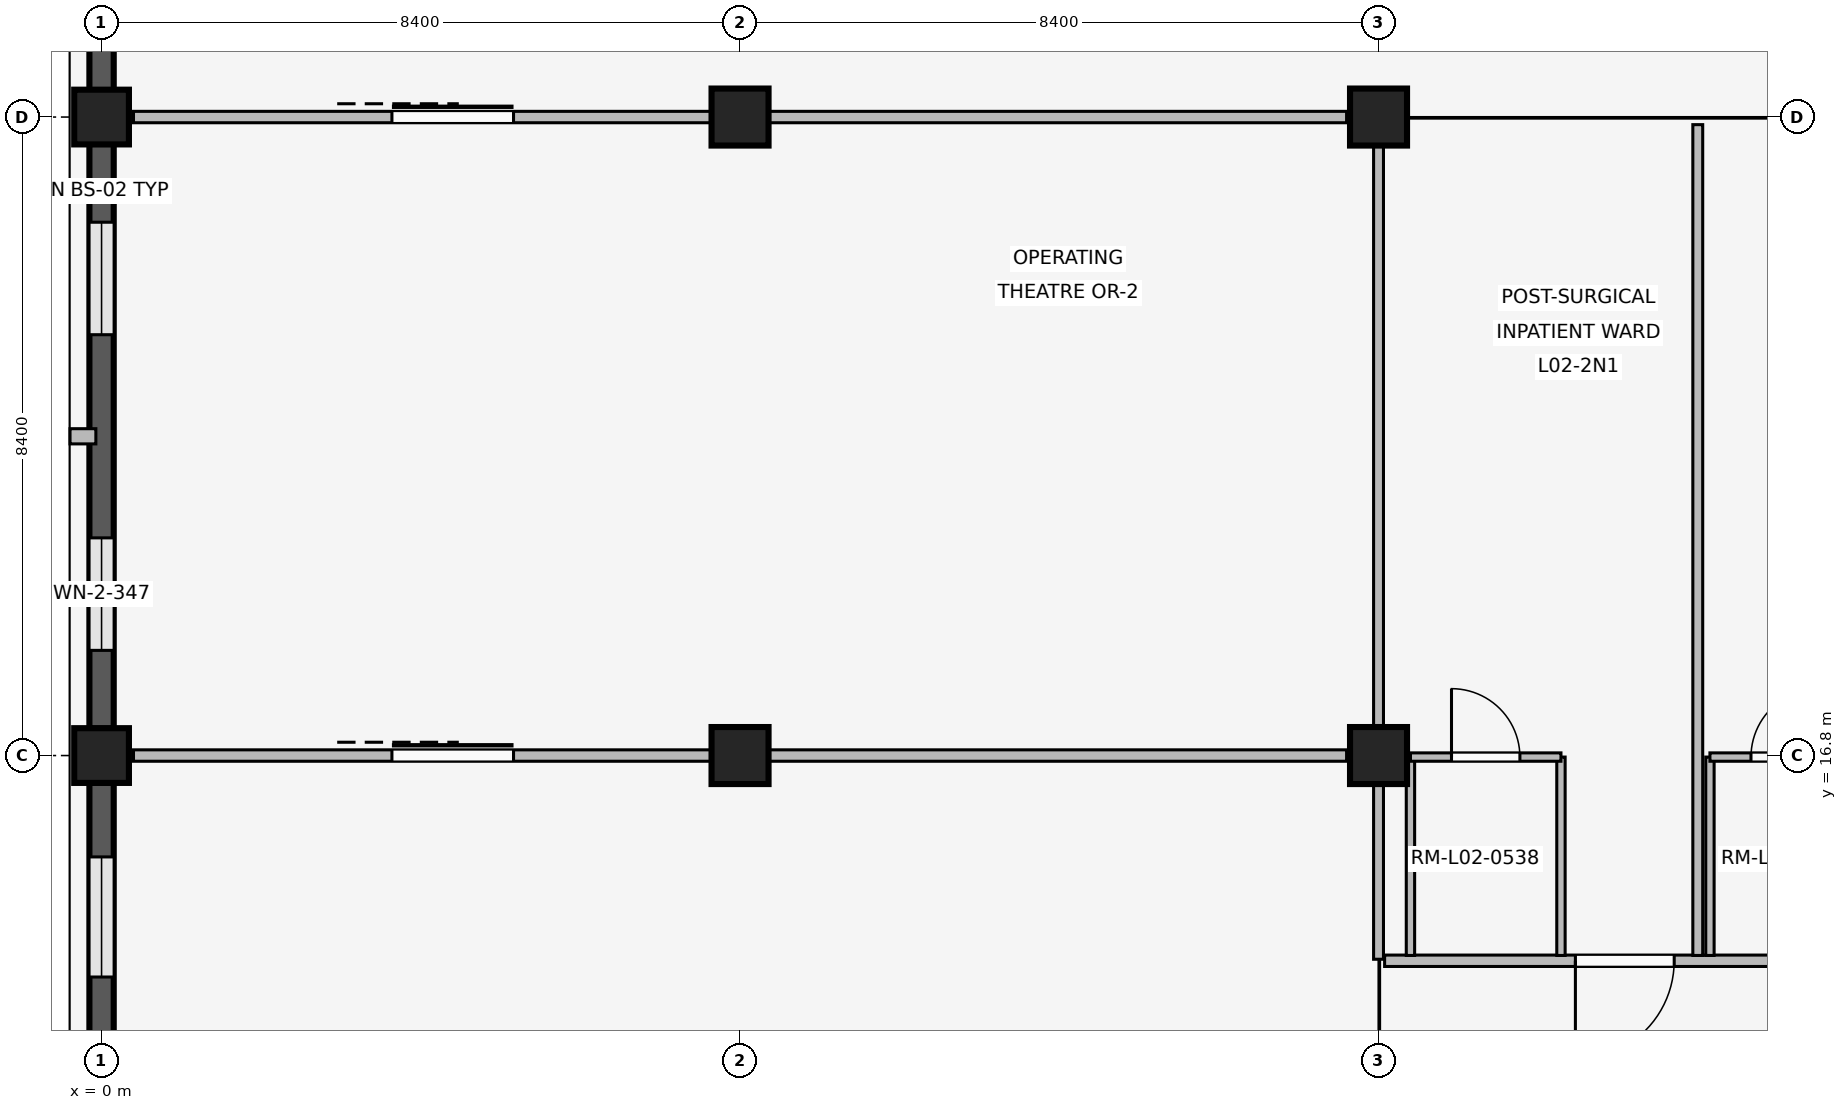
"""IFC4 building model, lengths in metres.
Left out: names, types, materials, properties, quantities, classifications, styles, units other than length and angle.
Written with IfcOpenShell. Run it as: python <this file> out.ifc"""

import sys

from ifc_helpers import new_model, si_unit, direction, frame, frame_2d, origin, origin_2d, place, context, subcontext, project, spatial, rectangle, extrude, element, fill, save


model = new_model("IFC4")
c1 = context("Model", 3, precision=1e-05, world=origin(), true_north=direction((0.0, 1.0)))
c2 = subcontext(c1, "Body", "Model", "MODEL_VIEW")
j1 = project(units=[si_unit("LENGTHUNIT", "METRE"), si_unit("PLANEANGLEUNIT", "RADIAN")], contexts=[c1])
p1 = place(None, origin())
s1 = spatial("IfcSite", under=j1, at=p1, CompositionType="ELEMENT")
p2 = place(p1, origin())
s2 = spatial("IfcBuilding", under=s1, at=p2, CompositionType="ELEMENT")
p3 = place(p2, frame((0.0, 0.0, 8.1)))
s3 = spatial("IfcBuildingStorey", under=s2, at=p3, CompositionType="ELEMENT", Elevation=8.1)
for number, where, z_axis, x_axis in (
    (1, (0.0, 16.8, 0.0), (0.0, 0.0, 1.0), (1.0, 0.0, 0.0)),
    (2, (0.0, 25.2, 0.0), (0.0, 0.0, 1.0), (1.0, 0.0, 0.0)),
):
    element("IfcColumn", number, at=place(p3, frame(where, z_axis=z_axis, x_axis=x_axis)), inside=s3, PredefinedType="COLUMN", context=c2, shape_type="SweptSolid", body=[
        extrude(rectangle(XDim=0.72, YDim=0.72, at=origin_2d()), origin(), (0.0, 0.0, 1.0), 4.8),
    ])
for number, where, z_axis, x_axis in (
    (3, (8.4, 16.8, 0.0), (0.0, 0.0, 1.0), (1.0, 0.0, 0.0)),
    (4, (8.4, 25.2, 0.0), (0.0, 0.0, 1.0), (1.0, 0.0, 0.0)),
    (5, (16.8, 16.8, 0.0), (0.0, 0.0, 1.0), (1.0, 0.0, 0.0)),
    (6, (16.8, 25.2, 0.0), (0.0, 0.0, 1.0), (1.0, 0.0, 0.0)),
):
    element("IfcColumn", number, at=place(p3, frame(where, z_axis=z_axis, x_axis=x_axis)), inside=s3, PredefinedType="COLUMN", context=c2, shape_type="SweptSolid", body=[
        extrude(rectangle(XDim=0.75, YDim=0.75, at=origin_2d()), origin(), (0.0, 0.0, 1.0), 4.8),
    ])
p4 = place(p3, frame((0.0, 8.755, 0.0), z_axis=(0.0, 0.0, 1.0), x_axis=(0.0, 1.0, 0.0)))
e7 = element("IfcWall", 7, at=p4, inside=s3, PredefinedType="SOLIDWALL", context=c2, shape_type="SweptSolid", body=[
    extrude(rectangle(XDim=7.69, YDim=0.32, at=frame_2d((3.845, 0.0))), origin(), (0.0, 0.0, 1.0), 3.86),
])
p5 = place(p4, frame((0.979, 0.0, 0.85)))
e8 = element("IfcOpeningElement", 8, at=p5, cuts=e7, PredefinedType="OPENING", context=c2, shape_type="SweptSolid", body=[
    extrude(rectangle(XDim=1.58, YDim=1.7, at=frame_2d((0.79, 0.85))), frame((0.0, 0.17, 0.0), z_axis=(0.0, -1.0, 0.0), x_axis=(1.0, 0.0, 0.0)), (0.0, 0.0, 1.0), 0.34),
])
p6 = place(p4, frame((5.131, 0.0, 0.85)))
e9 = element("IfcOpeningElement", 9, at=p6, cuts=e7, PredefinedType="OPENING", context=c2, shape_type="SweptSolid", body=[
    extrude(rectangle(XDim=1.58, YDim=1.7, at=frame_2d((0.79, 0.85))), frame((0.0, 0.17, 0.0), z_axis=(0.0, -1.0, 0.0), x_axis=(1.0, 0.0, 0.0)), (0.0, 0.0, 1.0), 0.34),
])
p7 = place(p3, frame((0.0, 17.155, 0.0), z_axis=(0.0, 0.0, 1.0), x_axis=(0.0, 1.0, 0.0)))
e10 = element("IfcWall", 10, at=p7, inside=s3, PredefinedType="SOLIDWALL", context=c2, shape_type="SweptSolid", body=[
    extrude(rectangle(XDim=7.69, YDim=0.32, at=frame_2d((3.845, 0.0))), origin(), (0.0, 0.0, 1.0), 3.86),
])
p8 = place(p7, frame((1.029, 0.0, 0.85)))
e11 = element("IfcOpeningElement", 11, at=p8, cuts=e10, PredefinedType="OPENING", context=c2, shape_type="SweptSolid", body=[
    extrude(rectangle(XDim=1.48, YDim=1.6, at=frame_2d((0.74, 0.8))), frame((0.0, 0.17, 0.0), z_axis=(0.0, -1.0, 0.0), x_axis=(1.0, 0.0, 0.0)), (0.0, 0.0, 1.0), 0.34),
])
p9 = place(p7, frame((5.181, 0.0, 0.85)))
e12 = element("IfcOpeningElement", 12, at=p9, cuts=e10, PredefinedType="OPENING", context=c2, shape_type="SweptSolid", body=[
    extrude(rectangle(XDim=1.48, YDim=1.6, at=frame_2d((0.74, 0.8))), frame((0.0, 0.17, 0.0), z_axis=(0.0, -1.0, 0.0), x_axis=(1.0, 0.0, 0.0)), (0.0, 0.0, 1.0), 0.34),
])
p10 = place(p3, frame((-0.075, 21.0, 0.0), z_axis=(0.0, 0.0, 1.0), x_axis=(-1.0, 0.0, 0.0)))
e13 = element("IfcWall", 13, at=p10, inside=s3, PredefinedType="ELEMENTEDWALL", context=c2, shape_type="SweptSolid", body=[
    extrude(rectangle(XDim=0.34, YDim=0.2, at=frame_2d((0.17, 0.0))), origin(), (0.0, 0.0, 1.0), 3.84),
])
p11 = place(p3, frame((0.0, 25.555, 0.0), z_axis=(0.0, 0.0, 1.0), x_axis=(0.0, 1.0, 0.0)))
e14 = element("IfcWall", 14, at=p11, inside=s3, PredefinedType="SOLIDWALL", context=c2, shape_type="SweptSolid", body=[
    extrude(rectangle(XDim=7.69, YDim=0.32, at=frame_2d((3.845, 0.0))), origin(), (0.0, 0.0, 1.0), 3.86),
])
p12 = place(p11, frame((1.059, 0.0, 0.85)))
e15 = element("IfcOpeningElement", 15, at=p12, cuts=e14, PredefinedType="OPENING", context=c2, shape_type="SweptSolid", body=[
    extrude(rectangle(XDim=1.42, YDim=1.45, at=frame_2d((0.71, 0.725))), frame((0.0, 0.17, 0.0), z_axis=(0.0, -1.0, 0.0), x_axis=(1.0, 0.0, 0.0)), (0.0, 0.0, 1.0), 0.34),
])
p13 = place(p11, frame((5.211, 0.0, 0.85)))
e16 = element("IfcOpeningElement", 16, at=p13, cuts=e14, PredefinedType="OPENING", context=c2, shape_type="SweptSolid", body=[
    extrude(rectangle(XDim=1.42, YDim=1.45, at=frame_2d((0.71, 0.725))), frame((0.0, 0.17, 0.0), z_axis=(0.0, -1.0, 0.0), x_axis=(1.0, 0.0, 0.0)), (0.0, 0.0, 1.0), 0.34),
])
p14 = place(p3, frame((16.8, 14.12, 0.0), z_axis=(0.0, 0.0, 1.0), x_axis=(0.0, 1.0, 0.0)))
e17 = element("IfcWall", 17, at=p14, inside=s3, PredefinedType="PARTITIONING", context=c2, shape_type="SweptSolid", body=[
    extrude(rectangle(XDim=10.94, YDim=0.13, at=frame_2d((5.47, 0.0))), origin(), (0.0, 0.0, 1.0), 3.84),
])
p15 = place(p3, frame((25.12, 14.1, 0.0), z_axis=(0.0, 0.0, 1.0), x_axis=(-1.0, 0.0, 0.0)))
e18 = element("IfcWall", 18, at=p15, inside=s3, PredefinedType="PARTITIONING", context=c2, shape_type="SweptSolid", body=[
    extrude(rectangle(XDim=8.24, YDim=0.15, at=frame_2d((4.12, 0.0))), origin(), (0.0, 0.0, 1.0), 3.84),
])
p16 = place(p15, frame((0.73, 0.0, 0.0)))
e19 = element("IfcOpeningElement", 19, at=p16, cuts=e18, PredefinedType="OPENING", context=c2, shape_type="SweptSolid", body=[
    extrude(rectangle(XDim=1.3, YDim=2.25, at=frame_2d((0.65, 1.125))), frame((0.0, 0.085, 0.0), z_axis=(0.0, -1.0, 0.0), x_axis=(1.0, 0.0, 0.0)), (0.0, 0.0, 1.0), 0.17),
])
p17 = place(p15, frame((4.43, 0.0, 0.0)))
e20 = element("IfcOpeningElement", 20, at=p17, cuts=e18, PredefinedType="OPENING", context=c2, shape_type="SweptSolid", body=[
    extrude(rectangle(XDim=1.3, YDim=2.25, at=frame_2d((0.65, 1.125))), frame((0.0, 0.085, 0.0), z_axis=(0.0, -1.0, 0.0), x_axis=(1.0, 0.0, 0.0)), (0.0, 0.0, 1.0), 0.17),
])
p18 = place(p3, frame((21.0, 14.17, 0.0), z_axis=(0.0, 0.0, 1.0), x_axis=(0.0, 1.0, 0.0)))
e21 = element("IfcWall", 21, at=p18, inside=s3, PredefinedType="PARTITIONING", context=c2, shape_type="SweptSolid", body=[
    extrude(rectangle(XDim=10.93, YDim=0.13, at=frame_2d((5.465, 0.0))), origin(), (0.0, 0.0, 1.0), 3.84),
])
for number, where, z_axis, x_axis in (
    (22, (17.22, 14.17, 0.0), (0.0, 0.0, 1.0), (0.0, 1.0, 0.0)),
    (23, (19.2, 14.17, 0.0), (0.0, 0.0, 1.0), (0.0, 1.0, 0.0)),
):
    element("IfcWall", number, at=place(p3, frame(where, z_axis=z_axis, x_axis=x_axis)), inside=s3, PredefinedType="PARTITIONING", context=c2, shape_type="SweptSolid", body=[
        extrude(rectangle(XDim=2.61, YDim=0.11, at=frame_2d((1.305, 0.0))), origin(), (0.0, 0.0, 1.0), 3.84),
    ])
p19 = place(p3, frame((17.22, 16.78, 0.0), z_axis=(0.0, 0.0, 1.0), x_axis=(1.0, 0.0, 0.0)))
e24 = element("IfcWall", 24, at=p19, inside=s3, PredefinedType="PARTITIONING", context=c2, shape_type="SweptSolid", body=[
    extrude(rectangle(XDim=1.98, YDim=0.11, at=frame_2d((0.99, 0.0))), origin(), (0.0, 0.0, 1.0), 3.84),
])
p20 = place(p19, frame((0.54, 0.0, 0.0)))
e25 = element("IfcOpeningElement", 25, at=p20, cuts=e24, PredefinedType="OPENING", context=c2, shape_type="SweptSolid", body=[
    extrude(rectangle(XDim=0.9, YDim=2.1, at=frame_2d((0.45, 1.05))), frame((0.0, 0.065, 0.0), z_axis=(0.0, -1.0, 0.0), x_axis=(1.0, 0.0, 0.0)), (0.0, 0.0, 1.0), 0.13),
])
p21 = place(p3, frame((21.16, 14.17, 0.0), z_axis=(0.0, 0.0, 1.0), x_axis=(0.0, 1.0, 0.0)))
e26 = element("IfcWall", 26, at=p21, inside=s3, PredefinedType="PARTITIONING", context=c2, shape_type="SweptSolid", body=[
    extrude(rectangle(XDim=2.61, YDim=0.11, at=frame_2d((1.305, 0.0))), origin(), (0.0, 0.0, 1.0), 3.84),
])
p22 = place(p3, frame((21.16, 16.78, 0.0), z_axis=(0.0, 0.0, 1.0), x_axis=(1.0, 0.0, 0.0)))
e27 = element("IfcWall", 27, at=p22, inside=s3, PredefinedType="PARTITIONING", context=c2, shape_type="SweptSolid", body=[
    extrude(rectangle(XDim=1.98, YDim=0.11, at=frame_2d((0.99, 0.0))), origin(), (0.0, 0.0, 1.0), 3.84),
])
p23 = place(p22, frame((0.54, 0.0, 0.0)))
e28 = element("IfcOpeningElement", 28, at=p23, cuts=e27, PredefinedType="OPENING", context=c2, shape_type="SweptSolid", body=[
    extrude(rectangle(XDim=0.9, YDim=2.1, at=frame_2d((0.45, 1.05))), frame((0.0, 0.065, 0.0), z_axis=(0.0, -1.0, 0.0), x_axis=(1.0, 0.0, 0.0)), (0.0, 0.0, 1.0), 0.13),
])
p24 = place(p3, frame((0.42, 16.8, 0.0), z_axis=(0.0, 0.0, 1.0), x_axis=(1.0, 0.0, 0.0)))
e29 = element("IfcWall", 29, at=p24, inside=s3, PredefinedType="PARTITIONING", context=c2, shape_type="SweptSolid", body=[
    extrude(rectangle(XDim=15.96, YDim=0.15, at=frame_2d((7.98, 0.0))), origin(), (0.0, 0.0, 1.0), 3.84),
])
p25 = place(p24, frame((3.4, 0.0, 0.0)))
e30 = element("IfcOpeningElement", 30, at=p25, cuts=e29, PredefinedType="OPENING", context=c2, shape_type="SweptSolid", body=[
    extrude(rectangle(XDim=1.6, YDim=2.35, at=frame_2d((0.8, 1.175))), frame((0.0, 0.085, 0.0), z_axis=(0.0, -1.0, 0.0), x_axis=(1.0, 0.0, 0.0)), (0.0, 0.0, 1.0), 0.17),
])
p26 = place(p3, frame((0.42, 25.2, 0.0), z_axis=(0.0, 0.0, 1.0), x_axis=(1.0, 0.0, 0.0)))
e31 = element("IfcWall", 31, at=p26, inside=s3, PredefinedType="PARTITIONING", context=c2, shape_type="SweptSolid", body=[
    extrude(rectangle(XDim=15.96, YDim=0.15, at=frame_2d((7.98, 0.0))), origin(), (0.0, 0.0, 1.0), 3.84),
])
p27 = place(p26, frame((3.4, 0.0, 0.0)))
e32 = element("IfcOpeningElement", 32, at=p27, cuts=e31, PredefinedType="OPENING", context=c2, shape_type="SweptSolid", body=[
    extrude(rectangle(XDim=1.6, YDim=2.35, at=frame_2d((0.8, 1.175))), frame((0.0, 0.085, 0.0), z_axis=(0.0, -1.0, 0.0), x_axis=(1.0, 0.0, 0.0)), (0.0, 0.0, 1.0), 0.17),
])
p28 = place(p6, origin())
e33 = element("IfcWindow", 33, at=p28, inside=s3, PartitioningType="SINGLE_PANEL", PredefinedType="WINDOW", context=c2, shape_type="SweptSolid", body=[
    extrude(rectangle(XDim=1.58, YDim=1.7, at=frame_2d((0.79, 0.85))), frame((0.0, 0.03, 0.0), z_axis=(0.0, -1.0, 0.0), x_axis=(1.0, 0.0, 0.0)), (0.0, 0.0, 1.0), 0.06),
])
fill(e9, e33)
p29 = place(p8, origin())
e34 = element("IfcWindow", 34, at=p29, inside=s3, PartitioningType="SINGLE_PANEL", PredefinedType="WINDOW", context=c2, shape_type="SweptSolid", body=[
    extrude(rectangle(XDim=1.48, YDim=1.6, at=frame_2d((0.74, 0.8))), frame((0.0, 0.03, 0.0), z_axis=(0.0, -1.0, 0.0), x_axis=(1.0, 0.0, 0.0)), (0.0, 0.0, 1.0), 0.06),
])
fill(e11, e34)
p30 = place(p9, origin())
e35 = element("IfcWindow", 35, at=p30, inside=s3, PartitioningType="SINGLE_PANEL", PredefinedType="WINDOW", context=c2, shape_type="SweptSolid", body=[
    extrude(rectangle(XDim=1.48, YDim=1.6, at=frame_2d((0.74, 0.8))), frame((0.0, 0.03, 0.0), z_axis=(0.0, -1.0, 0.0), x_axis=(1.0, 0.0, 0.0)), (0.0, 0.0, 1.0), 0.06),
])
fill(e12, e35)
p31 = place(p17, origin())
e36 = element("IfcDoor", 36, at=p31, inside=s3, OperationType="SINGLE_SWING_RIGHT", PredefinedType="DOOR", context=c2, shape_type="SweptSolid", body=[
    extrude(rectangle(XDim=1.3, YDim=2.25, at=frame_2d((0.65, 1.125))), frame((0.0, 0.025, 0.0), z_axis=(0.0, -1.0, 0.0), x_axis=(1.0, 0.0, 0.0)), (0.0, 0.0, 1.0), 0.05),
])
fill(e20, e36)
p32 = place(p20, origin())
e37 = element("IfcDoor", 37, at=p32, inside=s3, OperationType="SINGLE_SWING_LEFT", PredefinedType="DOOR", context=c2, shape_type="SweptSolid", body=[
    extrude(rectangle(XDim=0.9, YDim=2.1, at=frame_2d((0.45, 1.05))), frame((0.0, 0.025, 0.0), z_axis=(0.0, -1.0, 0.0), x_axis=(1.0, 0.0, 0.0)), (0.0, 0.0, 1.0), 0.05),
])
fill(e25, e37)
p33 = place(p23, origin())
e38 = element("IfcDoor", 38, at=p33, inside=s3, OperationType="SINGLE_SWING_RIGHT", PredefinedType="DOOR", context=c2, shape_type="SweptSolid", body=[
    extrude(rectangle(XDim=0.9, YDim=2.1, at=frame_2d((0.45, 1.05))), frame((0.0, 0.025, 0.0), z_axis=(0.0, -1.0, 0.0), x_axis=(1.0, 0.0, 0.0)), (0.0, 0.0, 1.0), 0.05),
])
fill(e28, e38)
p34 = place(p25, origin())
e39 = element("IfcDoor", 39, at=p34, inside=s3, OperationType="SLIDING_TO_LEFT", PredefinedType="DOOR", context=c2, shape_type="SweptSolid", body=[
    extrude(rectangle(XDim=1.6, YDim=2.35, at=frame_2d((0.8, 1.175))), frame((0.0, 0.025, 0.0), z_axis=(0.0, -1.0, 0.0), x_axis=(1.0, 0.0, 0.0)), (0.0, 0.0, 1.0), 0.05),
])
fill(e30, e39)
p35 = place(p27, origin())
e40 = element("IfcDoor", 40, at=p35, inside=s3, OperationType="SLIDING_TO_LEFT", PredefinedType="DOOR", context=c2, shape_type="SweptSolid", body=[
    extrude(rectangle(XDim=1.6, YDim=2.35, at=frame_2d((0.8, 1.175))), frame((0.0, 0.025, 0.0), z_axis=(0.0, -1.0, 0.0), x_axis=(1.0, 0.0, 0.0)), (0.0, 0.0, 1.0), 0.05),
])
fill(e32, e40)
save(model, sys.argv[1])
